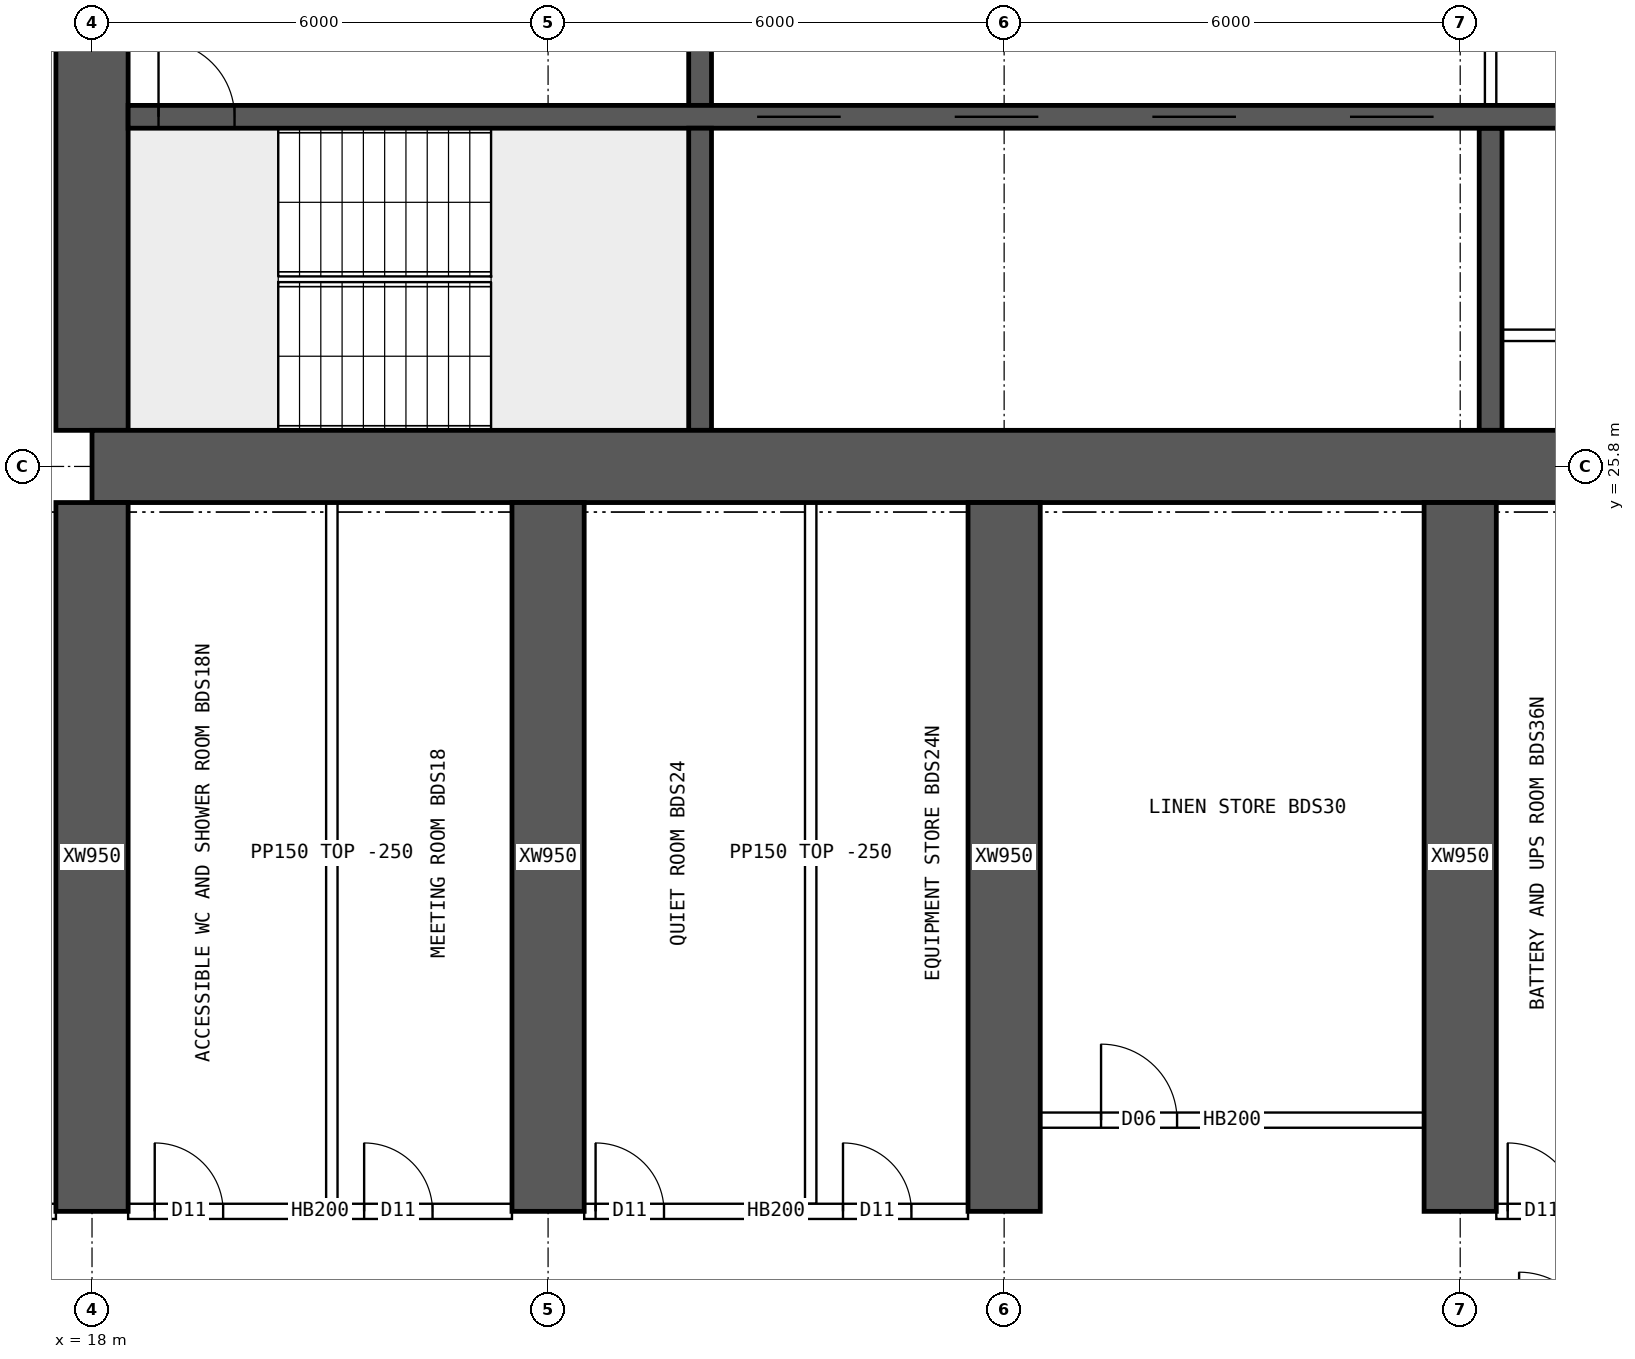
"""IFC4 building model, lengths in metres.
Left out: names, types, materials, properties, quantities, classifications, styles, units other than length and angle.
Written with IfcOpenShell. Run it as: python <this file> out.ifc"""

import sys

from ifc_helpers import new_model, si_unit, direction, frame, frame_2d, origin, place, context, subcontext, project, spatial, rectangle, extrude, element, fill, save


model = new_model("IFC4")
c1 = context("Model", 3, precision=1e-05, world=origin(), true_north=direction((0.0, 1.0)))
c2 = subcontext(c1, "Body", "Model", "MODEL_VIEW")
j1 = project(units=[si_unit("LENGTHUNIT", "METRE"), si_unit("PLANEANGLEUNIT", "RADIAN")], contexts=[c1])
p1 = place(None, origin())
s1 = spatial("IfcSite", under=j1, at=p1, CompositionType="ELEMENT")
p2 = place(p1, origin())
s2 = spatial("IfcBuilding", under=s1, at=p2, CompositionType="ELEMENT")
p3 = place(p2, frame((0.0, 0.0, 118.15)))
s3 = spatial("IfcBuildingStorey", under=s2, at=p3, CompositionType="ELEMENT", Elevation=118.15)
p4 = place(p3, frame((18.0, 25.8, 0.0), z_axis=(0.0, 0.0, 1.0), x_axis=(1.0, 0.0, 0.0)))
e1 = element("IfcWall", 1, at=p4, inside=s3, PredefinedType="SHEAR", context=c2, shape_type="SweptSolid", body=[
    extrude(rectangle(XDim=48.0, YDim=0.95, at=frame_2d((24.0, 0.0))), origin(), (0.0, 0.0, 1.0), 3.75),
])
p5 = place(p3, frame((18.0, 26.275, 0.0), z_axis=(0.0, 0.0, 1.0), x_axis=(0.0, 1.0, 0.0)))
e2 = element("IfcWall", 2, at=p5, inside=s3, PredefinedType="SHEAR", context=c2, shape_type="SweptSolid", body=[
    extrude(rectangle(XDim=11.45, YDim=0.95, at=frame_2d((5.725, 0.0))), origin(), (0.0, 0.0, 1.0), 3.75),
])
p6 = place(p5, frame((5.025, 0.0, 0.0)))
e3 = element("IfcOpeningElement", 3, at=p6, cuts=e2, PredefinedType="OPENING", context=c2, shape_type="SweptSolid", body=[
    extrude(rectangle(XDim=1.2, YDim=2.1, at=frame_2d((0.6, 1.05))), frame((0.0, 0.485, 0.0), z_axis=(0.0, -1.0, 0.0), x_axis=(1.0, 0.0, 0.0)), (0.0, 0.0, 1.0), 0.97),
])
p7 = place(p3, frame((18.475, 30.4, 0.0), z_axis=(0.0, 0.0, 1.0), x_axis=(1.0, 0.0, 0.0)))
e4 = element("IfcWall", 4, at=p7, inside=s3, PredefinedType="SHEAR", context=c2, shape_type="SweptSolid", body=[
    extrude(rectangle(XDim=47.05, YDim=0.3, at=frame_2d((23.525, 0.0))), origin(), (0.0, 0.0, 1.0), 3.75),
])
p8 = place(p7, frame((0.4, 0.0, 0.0)))
e5 = element("IfcOpeningElement", 5, at=p8, cuts=e4, PredefinedType="OPENING", context=c2, shape_type="SweptSolid", body=[
    extrude(rectangle(XDim=1.0, YDim=2.1, at=frame_2d((0.5, 1.05))), frame((0.0, 0.16, 0.0), z_axis=(0.0, -1.0, 0.0), x_axis=(1.0, 0.0, 0.0)), (0.0, 0.0, 1.0), 0.32),
])
p9 = place(p7, frame((45.65, 0.0, 0.0)))
e6 = element("IfcOpeningElement", 6, at=p9, cuts=e4, PredefinedType="OPENING", context=c2, shape_type="SweptSolid", body=[
    extrude(rectangle(XDim=1.0, YDim=2.1, at=frame_2d((0.5, 1.05))), frame((0.0, 0.16, 0.0), z_axis=(0.0, -1.0, 0.0), x_axis=(1.0, 0.0, 0.0)), (0.0, 0.0, 1.0), 0.32),
])
p10 = place(p7, frame((8.275, 0.0, 0.0)))
e7 = element("IfcOpeningElement", 7, at=p10, cuts=e4, PredefinedType="OPENING", context=c2, shape_type="SweptSolid", body=[
    extrude(rectangle(XDim=1.1, YDim=2.1, at=frame_2d((0.55, 1.05))), frame((0.0, 0.16, 0.0), z_axis=(0.0, -1.0, 0.0), x_axis=(1.0, 0.0, 0.0)), (0.0, 0.0, 1.0), 0.32),
])
p11 = place(p7, frame((10.875, 0.0, 0.0)))
e8 = element("IfcOpeningElement", 8, at=p11, cuts=e4, PredefinedType="OPENING", context=c2, shape_type="SweptSolid", body=[
    extrude(rectangle(XDim=1.1, YDim=2.1, at=frame_2d((0.55, 1.05))), frame((0.0, 0.16, 0.0), z_axis=(0.0, -1.0, 0.0), x_axis=(1.0, 0.0, 0.0)), (0.0, 0.0, 1.0), 0.32),
])
p12 = place(p7, frame((13.475, 0.0, 0.0)))
e9 = element("IfcOpeningElement", 9, at=p12, cuts=e4, PredefinedType="OPENING", context=c2, shape_type="SweptSolid", body=[
    extrude(rectangle(XDim=1.1, YDim=2.1, at=frame_2d((0.55, 1.05))), frame((0.0, 0.16, 0.0), z_axis=(0.0, -1.0, 0.0), x_axis=(1.0, 0.0, 0.0)), (0.0, 0.0, 1.0), 0.32),
])
p13 = place(p7, frame((16.075, 0.0, 0.0)))
e10 = element("IfcOpeningElement", 10, at=p13, cuts=e4, PredefinedType="OPENING", context=c2, shape_type="SweptSolid", body=[
    extrude(rectangle(XDim=1.1, YDim=2.1, at=frame_2d((0.55, 1.05))), frame((0.0, 0.16, 0.0), z_axis=(0.0, -1.0, 0.0), x_axis=(1.0, 0.0, 0.0)), (0.0, 0.0, 1.0), 0.32),
])
p14 = place(p7, frame((18.85, 0.0, 0.0)))
e11 = element("IfcOpeningElement", 11, at=p14, cuts=e4, PredefinedType="OPENING", context=c2, shape_type="SweptSolid", body=[
    extrude(rectangle(XDim=0.9, YDim=2.1, at=frame_2d((0.45, 1.05))), frame((0.0, 0.16, 0.0), z_axis=(0.0, -1.0, 0.0), x_axis=(1.0, 0.0, 0.0)), (0.0, 0.0, 1.0), 0.32),
])
p15 = place(p7, frame((30.142, 0.0, 0.0)))
e12 = element("IfcOpeningElement", 12, at=p15, cuts=e4, PredefinedType="OPENING", context=c2, shape_type="SweptSolid", body=[
    extrude(rectangle(XDim=1.1, YDim=2.1, at=frame_2d((0.55, 1.05))), frame((0.0, 0.16, 0.0), z_axis=(0.0, -1.0, 0.0), x_axis=(1.0, 0.0, 0.0)), (0.0, 0.0, 1.0), 0.32),
])
p16 = place(p7, frame((33.675, 0.0, 0.0)))
e13 = element("IfcOpeningElement", 13, at=p16, cuts=e4, PredefinedType="OPENING", context=c2, shape_type="SweptSolid", body=[
    extrude(rectangle(XDim=1.1, YDim=2.1, at=frame_2d((0.55, 1.05))), frame((0.0, 0.16, 0.0), z_axis=(0.0, -1.0, 0.0), x_axis=(1.0, 0.0, 0.0)), (0.0, 0.0, 1.0), 0.32),
])
p17 = place(p7, frame((37.208, 0.0, 0.0)))
e14 = element("IfcOpeningElement", 14, at=p17, cuts=e4, PredefinedType="OPENING", context=c2, shape_type="SweptSolid", body=[
    extrude(rectangle(XDim=1.1, YDim=2.1, at=frame_2d((0.55, 1.05))), frame((0.0, 0.16, 0.0), z_axis=(0.0, -1.0, 0.0), x_axis=(1.0, 0.0, 0.0)), (0.0, 0.0, 1.0), 0.32),
])
p18 = place(p3, frame((26.0, 26.275, 0.0), z_axis=(0.0, 0.0, 1.0), x_axis=(0.0, 1.0, 0.0)))
e15 = element("IfcWall", 15, at=p18, inside=s3, PredefinedType="SHEAR", context=c2, shape_type="SweptSolid", body=[
    extrude(rectangle(XDim=3.975, YDim=0.3, at=frame_2d((1.988, 0.0))), origin(), (0.0, 0.0, 1.0), 3.75),
])
p19 = place(p3, frame((26.0, 30.55, 0.0), z_axis=(0.0, 0.0, 1.0), x_axis=(0.0, 1.0, 0.0)))
e16 = element("IfcWall", 16, at=p19, inside=s3, PredefinedType="SHEAR", context=c2, shape_type="SweptSolid", body=[
    extrude(rectangle(XDim=3.9, YDim=0.3, at=frame_2d((1.95, 0.0))), origin(), (0.0, 0.0, 1.0), 3.75),
])
p20 = place(p19, frame((1.4, 0.0, 0.0)))
e17 = element("IfcOpeningElement", 17, at=p20, cuts=e16, PredefinedType="OPENING", context=c2, shape_type="SweptSolid", body=[
    extrude(rectangle(XDim=1.2, YDim=2.1, at=frame_2d((0.6, 1.05))), frame((0.0, 0.16, 0.0), z_axis=(0.0, -1.0, 0.0), x_axis=(1.0, 0.0, 0.0)), (0.0, 0.0, 1.0), 0.32),
])
p21 = place(p3, frame((36.4, 26.275, 0.0), z_axis=(0.0, 0.0, 1.0), x_axis=(0.0, 1.0, 0.0)))
e18 = element("IfcWall", 18, at=p21, inside=s3, PredefinedType="SHEAR", context=c2, shape_type="SweptSolid", body=[
    extrude(rectangle(XDim=3.975, YDim=0.3, at=frame_2d((1.988, 0.0))), origin(), (0.0, 0.0, 1.0), 3.75),
])
for number, where, z_axis, x_axis in (
    (19, (18.0, 16.0, 0.0), (0.0, 0.0, 1.0), (0.0, 1.0, 0.0)),
    (20, (24.0, 16.0, 0.0), (0.0, 0.0, 1.0), (0.0, 1.0, 0.0)),
    (21, (30.0, 16.0, 0.0), (0.0, 0.0, 1.0), (0.0, 1.0, 0.0)),
    (22, (36.0, 16.0, 0.0), (0.0, 0.0, 1.0), (0.0, 1.0, 0.0)),
):
    element("IfcWall", number, at=place(p3, frame(where, z_axis=z_axis, x_axis=x_axis)), inside=s3, PredefinedType="SHEAR", context=c2, shape_type="SweptSolid", body=[
        extrude(rectangle(XDim=9.325, YDim=0.95, at=frame_2d((4.663, 0.0))), origin(), (0.0, 0.0, 1.0), 3.75),
    ])
p22 = place(p3, frame((36.4, 30.55, 0.0), z_axis=(0.0, 0.0, 1.0), x_axis=(0.0, 1.0, 0.0)))
e23 = element("IfcWall", 23, at=p22, inside=s3, PredefinedType="SOLIDWALL", context=c2, shape_type="SweptSolid", body=[
    extrude(rectangle(XDim=3.9, YDim=0.15, at=frame_2d((1.95, 0.0))), origin(), (0.0, 0.0, 1.0), 3.5),
])
p23 = place(p22, frame((1.15, 0.0, 0.0)))
e24 = element("IfcOpeningElement", 24, at=p23, cuts=e23, PredefinedType="OPENING", context=c2, shape_type="SweptSolid", body=[
    extrude(rectangle(XDim=1.6, YDim=2.1, at=frame_2d((0.8, 1.05))), frame((0.0, 0.085, 0.0), z_axis=(0.0, -1.0, 0.0), x_axis=(1.0, 0.0, 0.0)), (0.0, 0.0, 1.0), 0.17),
])
p24 = place(p3, frame((36.55, 27.525, 0.0), z_axis=(0.0, 0.0, 1.0), x_axis=(1.0, 0.0, 0.0)))
e25 = element("IfcWall", 25, at=p24, inside=s3, PredefinedType="SOLIDWALL", context=c2, shape_type="SweptSolid", body=[
    extrude(rectangle(XDim=2.5, YDim=0.15, at=frame_2d((1.25, 0.0))), origin(), (0.0, 0.0, 1.0), 3.5),
])
p25 = place(p24, frame((0.8, 0.0, 0.0)))
e26 = element("IfcOpeningElement", 26, at=p25, cuts=e25, PredefinedType="OPENING", context=c2, shape_type="SweptSolid", body=[
    extrude(rectangle(XDim=0.9, YDim=2.1, at=frame_2d((0.45, 1.05))), frame((0.0, 0.085, 0.0), z_axis=(0.0, -1.0, 0.0), x_axis=(1.0, 0.0, 0.0)), (0.0, 0.0, 1.0), 0.17),
])
p26 = place(p3, frame((12.475, 16.0, 0.0), z_axis=(0.0, 0.0, 1.0), x_axis=(1.0, 0.0, 0.0)))
e27 = element("IfcWall", 27, at=p26, inside=s3, PredefinedType="SOLIDWALL", context=c2, shape_type="SweptSolid", body=[
    extrude(rectangle(XDim=5.05, YDim=0.2, at=frame_2d((2.525, 0.0))), origin(), (0.0, 0.0, 1.0), 3.5),
])
p27 = place(p26, frame((3.325, 0.0, 0.0)))
e28 = element("IfcOpeningElement", 28, at=p27, cuts=e27, PredefinedType="OPENING", context=c2, shape_type="SweptSolid", body=[
    extrude(rectangle(XDim=1.6, YDim=2.1, at=frame_2d((0.8, 1.05))), frame((0.0, 0.11, 0.0), z_axis=(0.0, -1.0, 0.0), x_axis=(1.0, 0.0, 0.0)), (0.0, 0.0, 1.0), 0.22),
])
p28 = place(p3, frame((18.475, 16.0, 0.0), z_axis=(0.0, 0.0, 1.0), x_axis=(1.0, 0.0, 0.0)))
e29 = element("IfcWall", 29, at=p28, inside=s3, PredefinedType="SOLIDWALL", context=c2, shape_type="SweptSolid", body=[
    extrude(rectangle(XDim=5.05, YDim=0.2, at=frame_2d((2.525, 0.0))), origin(), (0.0, 0.0, 1.0), 3.5),
])
p29 = place(p28, frame((0.35, 0.0, 0.0)))
e30 = element("IfcOpeningElement", 30, at=p29, cuts=e29, PredefinedType="OPENING", context=c2, shape_type="SweptSolid", body=[
    extrude(rectangle(XDim=0.9, YDim=2.1, at=frame_2d((0.45, 1.05))), frame((0.0, 0.11, 0.0), z_axis=(0.0, -1.0, 0.0), x_axis=(1.0, 0.0, 0.0)), (0.0, 0.0, 1.0), 0.22),
])
p30 = place(p28, frame((3.105, 0.0, 0.0)))
e31 = element("IfcOpeningElement", 31, at=p30, cuts=e29, PredefinedType="OPENING", context=c2, shape_type="SweptSolid", body=[
    extrude(rectangle(XDim=0.9, YDim=2.1, at=frame_2d((0.45, 1.05))), frame((0.0, 0.11, 0.0), z_axis=(0.0, -1.0, 0.0), x_axis=(1.0, 0.0, 0.0)), (0.0, 0.0, 1.0), 0.22),
])
p31 = place(p3, frame((24.475, 16.0, 0.0), z_axis=(0.0, 0.0, 1.0), x_axis=(1.0, 0.0, 0.0)))
e32 = element("IfcWall", 32, at=p31, inside=s3, PredefinedType="SOLIDWALL", context=c2, shape_type="SweptSolid", body=[
    extrude(rectangle(XDim=5.05, YDim=0.2, at=frame_2d((2.525, 0.0))), origin(), (0.0, 0.0, 1.0), 3.5),
])
p32 = place(p31, frame((0.15, 0.0, 0.0)))
e33 = element("IfcOpeningElement", 33, at=p32, cuts=e32, PredefinedType="OPENING", context=c2, shape_type="SweptSolid", body=[
    extrude(rectangle(XDim=0.9, YDim=2.1, at=frame_2d((0.45, 1.05))), frame((0.0, 0.11, 0.0), z_axis=(0.0, -1.0, 0.0), x_axis=(1.0, 0.0, 0.0)), (0.0, 0.0, 1.0), 0.22),
])
p33 = place(p31, frame((3.405, 0.0, 0.0)))
e34 = element("IfcOpeningElement", 34, at=p33, cuts=e32, PredefinedType="OPENING", context=c2, shape_type="SweptSolid", body=[
    extrude(rectangle(XDim=0.9, YDim=2.1, at=frame_2d((0.45, 1.05))), frame((0.0, 0.11, 0.0), z_axis=(0.0, -1.0, 0.0), x_axis=(1.0, 0.0, 0.0)), (0.0, 0.0, 1.0), 0.22),
])
p34 = place(p3, frame((36.475, 16.0, 0.0), z_axis=(0.0, 0.0, 1.0), x_axis=(1.0, 0.0, 0.0)))
e35 = element("IfcWall", 35, at=p34, inside=s3, PredefinedType="SOLIDWALL", context=c2, shape_type="SweptSolid", body=[
    extrude(rectangle(XDim=5.05, YDim=0.2, at=frame_2d((2.525, 0.0))), origin(), (0.0, 0.0, 1.0), 3.5),
])
p35 = place(p34, frame((0.15, 0.0, 0.0)))
e36 = element("IfcOpeningElement", 36, at=p35, cuts=e35, PredefinedType="OPENING", context=c2, shape_type="SweptSolid", body=[
    extrude(rectangle(XDim=0.9, YDim=2.1, at=frame_2d((0.45, 1.05))), frame((0.0, 0.11, 0.0), z_axis=(0.0, -1.0, 0.0), x_axis=(1.0, 0.0, 0.0)), (0.0, 0.0, 1.0), 0.22),
])
p36 = place(p34, frame((2.615, 0.0, 0.0)))
e37 = element("IfcOpeningElement", 37, at=p36, cuts=e35, PredefinedType="OPENING", context=c2, shape_type="SweptSolid", body=[
    extrude(rectangle(XDim=0.9, YDim=2.1, at=frame_2d((0.45, 1.05))), frame((0.0, 0.11, 0.0), z_axis=(0.0, -1.0, 0.0), x_axis=(1.0, 0.0, 0.0)), (0.0, 0.0, 1.0), 0.22),
])
for number, where, z_axis, x_axis in (
    (38, (21.155, 16.1, 0.0), (0.0, 0.0, 1.0), (0.0, 1.0, 0.0)),
    (39, (27.455, 16.1, 0.0), (0.0, 0.0, 1.0), (0.0, 1.0, 0.0)),
):
    element("IfcWall", number, at=place(p3, frame(where, z_axis=z_axis, x_axis=x_axis)), inside=s3, PredefinedType="PARTITIONING", context=c2, shape_type="SweptSolid", body=[
        extrude(rectangle(XDim=9.225, YDim=0.15, at=frame_2d((4.612, 0.0))), origin(), (0.0, 0.0, 1.0), 3.5),
    ])
p37 = place(p3, frame((30.475, 17.2, 0.0), z_axis=(0.0, 0.0, 1.0), x_axis=(1.0, 0.0, 0.0)))
e40 = element("IfcWall", 40, at=p37, inside=s3, PredefinedType="SOLIDWALL", context=c2, shape_type="SweptSolid", body=[
    extrude(rectangle(XDim=5.05, YDim=0.2, at=frame_2d((2.525, 0.0))), origin(), (0.0, 0.0, 1.0), 3.5),
])
p38 = place(p37, frame((0.8, 0.0, 0.0)))
e41 = element("IfcOpeningElement", 41, at=p38, cuts=e40, PredefinedType="OPENING", context=c2, shape_type="SweptSolid", body=[
    extrude(rectangle(XDim=1.0, YDim=2.1, at=frame_2d((0.5, 1.05))), frame((0.0, 0.11, 0.0), z_axis=(0.0, -1.0, 0.0), x_axis=(1.0, 0.0, 0.0)), (0.0, 0.0, 1.0), 0.22),
])
p39 = place(p8, origin())
e42 = element("IfcDoor", 42, at=p39, inside=s3, OperationType="SINGLE_SWING_LEFT", PredefinedType="DOOR", context=c2, shape_type="SweptSolid", body=[
    extrude(rectangle(XDim=1.0, YDim=2.1, at=frame_2d((0.5, 1.05))), frame((0.0, 0.025, 0.0), z_axis=(0.0, -1.0, 0.0), x_axis=(1.0, 0.0, 0.0)), (0.0, 0.0, 1.0), 0.05),
])
fill(e5, e42)
p40 = place(p10, origin())
e43 = element("IfcDoor", 43, at=p40, inside=s3, OperationType="DOUBLE_DOOR_SLIDING", PredefinedType="DOOR", context=c2, shape_type="SweptSolid", body=[
    extrude(rectangle(XDim=1.1, YDim=2.1, at=frame_2d((0.55, 1.05))), frame((0.0, 0.025, 0.0), z_axis=(0.0, -1.0, 0.0), x_axis=(1.0, 0.0, 0.0)), (0.0, 0.0, 1.0), 0.05),
])
fill(e7, e43)
p41 = place(p11, origin())
e44 = element("IfcDoor", 44, at=p41, inside=s3, OperationType="DOUBLE_DOOR_SLIDING", PredefinedType="DOOR", context=c2, shape_type="SweptSolid", body=[
    extrude(rectangle(XDim=1.1, YDim=2.1, at=frame_2d((0.55, 1.05))), frame((0.0, 0.025, 0.0), z_axis=(0.0, -1.0, 0.0), x_axis=(1.0, 0.0, 0.0)), (0.0, 0.0, 1.0), 0.05),
])
fill(e8, e44)
p42 = place(p12, origin())
e45 = element("IfcDoor", 45, at=p42, inside=s3, OperationType="DOUBLE_DOOR_SLIDING", PredefinedType="DOOR", context=c2, shape_type="SweptSolid", body=[
    extrude(rectangle(XDim=1.1, YDim=2.1, at=frame_2d((0.55, 1.05))), frame((0.0, 0.025, 0.0), z_axis=(0.0, -1.0, 0.0), x_axis=(1.0, 0.0, 0.0)), (0.0, 0.0, 1.0), 0.05),
])
fill(e9, e45)
p43 = place(p13, origin())
e46 = element("IfcDoor", 46, at=p43, inside=s3, OperationType="DOUBLE_DOOR_SLIDING", PredefinedType="DOOR", context=c2, shape_type="SweptSolid", body=[
    extrude(rectangle(XDim=1.1, YDim=2.1, at=frame_2d((0.55, 1.05))), frame((0.0, 0.025, 0.0), z_axis=(0.0, -1.0, 0.0), x_axis=(1.0, 0.0, 0.0)), (0.0, 0.0, 1.0), 0.05),
])
fill(e10, e46)
p44 = place(p29, origin())
e47 = element("IfcDoor", 47, at=p44, inside=s3, OperationType="SINGLE_SWING_LEFT", PredefinedType="DOOR", context=c2, shape_type="SweptSolid", body=[
    extrude(rectangle(XDim=0.9, YDim=2.1, at=frame_2d((0.45, 1.05))), frame((0.0, 0.025, 0.0), z_axis=(0.0, -1.0, 0.0), x_axis=(1.0, 0.0, 0.0)), (0.0, 0.0, 1.0), 0.05),
])
fill(e30, e47)
p45 = place(p30, origin())
e48 = element("IfcDoor", 48, at=p45, inside=s3, OperationType="SINGLE_SWING_LEFT", PredefinedType="DOOR", context=c2, shape_type="SweptSolid", body=[
    extrude(rectangle(XDim=0.9, YDim=2.1, at=frame_2d((0.45, 1.05))), frame((0.0, 0.025, 0.0), z_axis=(0.0, -1.0, 0.0), x_axis=(1.0, 0.0, 0.0)), (0.0, 0.0, 1.0), 0.05),
])
fill(e31, e48)
p46 = place(p32, origin())
e49 = element("IfcDoor", 49, at=p46, inside=s3, OperationType="SINGLE_SWING_LEFT", PredefinedType="DOOR", context=c2, shape_type="SweptSolid", body=[
    extrude(rectangle(XDim=0.9, YDim=2.1, at=frame_2d((0.45, 1.05))), frame((0.0, 0.025, 0.0), z_axis=(0.0, -1.0, 0.0), x_axis=(1.0, 0.0, 0.0)), (0.0, 0.0, 1.0), 0.05),
])
fill(e33, e49)
p47 = place(p33, origin())
e50 = element("IfcDoor", 50, at=p47, inside=s3, OperationType="SINGLE_SWING_LEFT", PredefinedType="DOOR", context=c2, shape_type="SweptSolid", body=[
    extrude(rectangle(XDim=0.9, YDim=2.1, at=frame_2d((0.45, 1.05))), frame((0.0, 0.025, 0.0), z_axis=(0.0, -1.0, 0.0), x_axis=(1.0, 0.0, 0.0)), (0.0, 0.0, 1.0), 0.05),
])
fill(e34, e50)
p48 = place(p38, origin())
e51 = element("IfcDoor", 51, at=p48, inside=s3, OperationType="SINGLE_SWING_LEFT", PredefinedType="DOOR", context=c2, shape_type="SweptSolid", body=[
    extrude(rectangle(XDim=1.0, YDim=2.1, at=frame_2d((0.5, 1.05))), frame((0.0, 0.025, 0.0), z_axis=(0.0, -1.0, 0.0), x_axis=(1.0, 0.0, 0.0)), (0.0, 0.0, 1.0), 0.05),
])
fill(e41, e51)
p49 = place(p35, origin())
e52 = element("IfcDoor", 52, at=p49, inside=s3, OperationType="SINGLE_SWING_LEFT", PredefinedType="DOOR", context=c2, shape_type="SweptSolid", body=[
    extrude(rectangle(XDim=0.9, YDim=2.1, at=frame_2d((0.45, 1.05))), frame((0.0, 0.025, 0.0), z_axis=(0.0, -1.0, 0.0), x_axis=(1.0, 0.0, 0.0)), (0.0, 0.0, 1.0), 0.05),
])
fill(e36, e52)
save(model, sys.argv[1])
